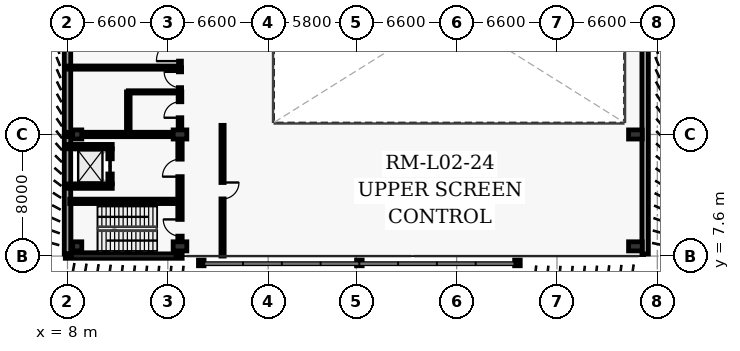
"""IFC4 building model, lengths in metres.
Left out: names, types, materials, properties, quantities, classifications, styles, units other than length and angle.
Written with IfcOpenShell. Run it as: python <this file> out.ifc"""

import sys

from ifc_helpers import new_model, si_unit, direction, frame, frame_2d, origin, origin_2d, place, context, subcontext, project, spatial, rectangle, i_section, extrude, element, fill, save


model = new_model("IFC4")
c1 = context("Model", 3, precision=1e-05, world=origin(), true_north=direction((0.0, 1.0)))
c2 = subcontext(c1, "Body", "Model", "MODEL_VIEW")
j1 = project(units=[si_unit("LENGTHUNIT", "METRE"), si_unit("PLANEANGLEUNIT", "RADIAN")], contexts=[c1])
p1 = place(None, origin())
s1 = spatial("IfcSite", under=j1, at=p1, CompositionType="ELEMENT")
p2 = place(p1, origin())
s2 = spatial("IfcBuilding", under=s1, at=p2, CompositionType="ELEMENT")
p3 = place(p2, frame((0.0, 0.0, 10.2)))
s3 = spatial("IfcBuildingStorey", under=s2, at=p3, CompositionType="ELEMENT", Elevation=10.2)
for number, where, z_axis, x_axis in (
    (1, (8.64, 8.24, 0.0), (0.0, 0.0, 1.0), (1.0, 0.0, 0.0)),
    (2, (8.64, 15.6, 0.0), (0.0, 0.0, 1.0), (1.0, 0.0, 0.0)),
):
    element("IfcColumn", number, at=place(p3, frame(where, z_axis=z_axis, x_axis=x_axis)), inside=s3, PredefinedType="COLUMN", context=c2, shape_type="SweptSolid", body=[
        extrude(rectangle(XDim=0.6, YDim=0.6, at=origin_2d()), origin(), (0.0, 0.0, 1.0), 5.4),
    ])
for number, where, z_axis, x_axis in (
    (3, (15.4, 8.24, 0.0), (0.0, 0.0, 1.0), (1.0, 0.0, 0.0)),
    (4, (15.4, 15.6, 0.0), (0.0, 0.0, 1.0), (1.0, 0.0, 0.0)),
    (5, (45.36, 8.24, 0.0), (0.0, 0.0, 1.0), (1.0, 0.0, 0.0)),
    (6, (45.36, 15.6, 0.0), (0.0, 0.0, 1.0), (1.0, 0.0, 0.0)),
):
    element("IfcColumn", number, at=place(p3, frame(where, z_axis=z_axis, x_axis=x_axis)), inside=s3, PredefinedType="COLUMN", context=c2, shape_type="SweptSolid", body=[
        extrude(rectangle(XDim=0.6, YDim=0.9, at=origin_2d()), origin(), (0.0, 0.0, 1.0), 5.4),
    ])
for number, where, z_axis, x_axis in (
    (7, (16.8, 7.15, 0.0), (0.0, 0.0, 1.0), (1.0, 0.0, 0.0)),
    (8, (27.2, 7.15, 0.0), (0.0, 0.0, 1.0), (1.0, 0.0, 0.0)),
    (9, (37.6, 7.15, 0.0), (0.0, 0.0, 1.0), (1.0, 0.0, 0.0)),
):
    element("IfcColumn", number, at=place(p3, frame(where, z_axis=z_axis, x_axis=x_axis)), inside=s3, PredefinedType="COLUMN", context=c2, shape_type="SweptSolid", body=[
        extrude(i_section(OverallWidth=0.373, OverallDepth=0.368, WebThickness=0.014, FlangeThickness=0.024, at=origin_2d()), origin(), (0.0, 0.0, 1.0), 5.4),
    ])
for number, where, z_axis, x_axis in (
    (10, (46.0, 63.46, 0.0), (0.0, 0.0, 1.0), (0.0, -1.0, 0.0)),
    (11, (8.0, 7.74, 0.0), (0.0, 0.0, 1.0), (0.0, 1.0, 0.0)),
):
    element("IfcWall", number, at=place(p3, frame(where, z_axis=z_axis, x_axis=x_axis)), inside=s3, PredefinedType="SOLIDWALL", context=c2, shape_type="SweptSolid", body=[
        extrude(rectangle(XDim=55.72, YDim=0.425, at=frame_2d((27.86, 0.0))), origin(), (0.0, 0.0, 1.0), 5.16),
    ])
p4 = place(p3, frame((7.855, 7.6, 0.0), z_axis=(0.0, 0.0, 1.0), x_axis=(1.0, 0.0, 0.0)))
e12 = element("IfcWall", 12, at=p4, inside=s3, PredefinedType="SHEAR", context=c2, shape_type="SweptSolid", body=[
    extrude(rectangle(XDim=7.69, YDim=0.29, at=frame_2d((3.845, 0.0))), origin(), (0.0, 0.0, 1.0), 5.16),
])
p5 = place(p3, frame((7.855, 15.6, 0.0), z_axis=(0.0, 0.0, 1.0), x_axis=(1.0, 0.0, 0.0)))
e13 = element("IfcWall", 13, at=p5, inside=s3, PredefinedType="SHEAR", context=c2, shape_type="SweptSolid", body=[
    extrude(rectangle(XDim=7.243, YDim=0.29, at=frame_2d((3.622, 0.0))), origin(), (0.0, 0.0, 1.0), 5.16),
])
p6 = place(p3, frame((15.4, 8.692, 0.0), z_axis=(0.0, 0.0, 1.0), x_axis=(0.0, 1.0, 0.0)))
e14 = element("IfcWall", 14, at=p6, inside=s3, PredefinedType="SHEAR", context=c2, shape_type="SweptSolid", body=[
    extrude(rectangle(XDim=6.456, YDim=0.29, at=frame_2d((3.228, 0.0))), origin(), (0.0, 0.0, 1.0), 5.16),
])
p7 = place(p6, frame((0.22, 0.0, 0.0)))
e15 = element("IfcOpeningElement", 15, at=p7, cuts=e14, PredefinedType="OPENING", context=c2, shape_type="SweptSolid", body=[
    extrude(rectangle(XDim=1.1, YDim=2.15, at=frame_2d((0.55, 1.075))), frame((0.0, 0.155, 0.0), z_axis=(0.0, -1.0, 0.0), x_axis=(1.0, 0.0, 0.0)), (0.0, 0.0, 1.0), 0.31),
])
p8 = place(p6, frame((4.133, 0.0, 0.0)))
e16 = element("IfcOpeningElement", 16, at=p8, cuts=e14, PredefinedType="OPENING", context=c2, shape_type="SweptSolid", body=[
    extrude(rectangle(XDim=1.15, YDim=2.2, at=frame_2d((0.575, 1.1))), frame((0.0, 0.155, 0.0), z_axis=(0.0, -1.0, 0.0), x_axis=(1.0, 0.0, 0.0)), (0.0, 0.0, 1.0), 0.31),
])
p9 = place(p3, frame((8.145, 11.2, 0.0), z_axis=(0.0, 0.0, 1.0), x_axis=(1.0, 0.0, 0.0)))
e17 = element("IfcWall", 17, at=p9, inside=s3, PredefinedType="SHEAR", context=c2, shape_type="SweptSolid", body=[
    extrude(rectangle(XDim=7.11, YDim=0.29, at=frame_2d((3.555, 0.0))), origin(), (0.0, 0.0, 1.0), 5.16),
])
for number, where, z_axis, x_axis in (
    (18, (8.055, 12.2, 0.0), (0.0, 0.0, 1.0), (1.0, 0.0, 0.0)),
    (19, (8.055, 14.8, 0.0), (0.0, 0.0, 1.0), (1.0, 0.0, 0.0)),
):
    element("IfcWall", number, at=place(p3, frame(where, z_axis=z_axis, x_axis=x_axis)), inside=s3, PredefinedType="SHEAR", context=c2, shape_type="SweptSolid", body=[
        extrude(rectangle(XDim=2.89, YDim=0.29, at=frame_2d((1.445, 0.0))), origin(), (0.0, 0.0, 1.0), 5.16),
    ])
p10 = place(p3, frame((10.8, 12.345, 0.0), z_axis=(0.0, 0.0, 1.0), x_axis=(0.0, 1.0, 0.0)))
e20 = element("IfcWall", 20, at=p10, inside=s3, PredefinedType="SHEAR", context=c2, shape_type="SweptSolid", body=[
    extrude(rectangle(XDim=2.31, YDim=0.29, at=frame_2d((1.155, 0.0))), origin(), (0.0, 0.0, 1.0), 5.16),
])
p11 = place(p10, frame((0.655, 0.0, 0.0)))
e21 = element("IfcOpeningElement", 21, at=p11, cuts=e20, PredefinedType="OPENING", context=c2, shape_type="SweptSolid", body=[
    extrude(rectangle(XDim=1.0, YDim=2.15, at=frame_2d((0.5, 1.075))), frame((0.0, 0.155, 0.0), z_axis=(0.0, -1.0, 0.0), x_axis=(1.0, 0.0, 0.0)), (0.0, 0.0, 1.0), 0.31),
])
p12 = place(p3, frame((15.4, 16.052, 0.0), z_axis=(0.0, 0.0, 1.0), x_axis=(0.0, 1.0, 0.0)))
e22 = element("IfcWall", 22, at=p12, inside=s3, PredefinedType="PARTITIONING", context=c2, shape_type="SweptSolid", body=[
    extrude(rectangle(XDim=2.348, YDim=0.24, at=frame_2d((1.174, 0.0))), origin(), (0.0, 0.0, 1.0), 4.31),
])
p13 = place(p12, frame((0.649, 0.0, 0.0)))
e23 = element("IfcOpeningElement", 23, at=p13, cuts=e22, PredefinedType="OPENING", context=c2, shape_type="SweptSolid", body=[
    extrude(rectangle(XDim=1.05, YDim=2.15, at=frame_2d((0.525, 1.075))), frame((0.0, 0.13, 0.0), z_axis=(0.0, -1.0, 0.0), x_axis=(1.0, 0.0, 0.0)), (0.0, 0.0, 1.0), 0.26),
])
p14 = place(p3, frame((15.4, 18.4, 0.0), z_axis=(0.0, 0.0, 1.0), x_axis=(0.0, 1.0, 0.0)))
e24 = element("IfcWall", 24, at=p14, inside=s3, PredefinedType="PARTITIONING", context=c2, shape_type="SweptSolid", body=[
    extrude(rectangle(XDim=1.6, YDim=0.21, at=frame_2d((0.8, 0.0))), origin(), (0.0, 0.0, 1.0), 4.31),
])
p15 = place(p14, frame((0.28, 0.0, 0.0)))
e25 = element("IfcOpeningElement", 25, at=p15, cuts=e24, PredefinedType="OPENING", context=c2, shape_type="SweptSolid", body=[
    extrude(rectangle(XDim=1.04, YDim=2.2, at=frame_2d((0.52, 1.1))), frame((0.0, 0.115, 0.0), z_axis=(0.0, -1.0, 0.0), x_axis=(1.0, 0.0, 0.0)), (0.0, 0.0, 1.0), 0.23),
])
p16 = place(p3, frame((15.4, 20.0, 0.0), z_axis=(0.0, 0.0, 1.0), x_axis=(0.0, 1.0, 0.0)))
e26 = element("IfcWall", 26, at=p16, inside=s3, PredefinedType="PARTITIONING", context=c2, shape_type="SweptSolid", body=[
    extrude(rectangle(XDim=2.4, YDim=0.19, at=frame_2d((1.2, 0.0))), origin(), (0.0, 0.0, 1.0), 4.31),
])
p17 = place(p16, frame((0.425, 0.0, 0.0)))
e27 = element("IfcOpeningElement", 27, at=p17, cuts=e26, PredefinedType="OPENING", context=c2, shape_type="SweptSolid", body=[
    extrude(rectangle(XDim=1.55, YDim=2.25, at=frame_2d((0.775, 1.125))), frame((0.0, 0.105, 0.0), z_axis=(0.0, -1.0, 0.0), x_axis=(1.0, 0.0, 0.0)), (0.0, 0.0, 1.0), 0.21),
])
p18 = place(p3, frame((18.2, 16.2, 0.0), z_axis=(0.0, 0.0, 1.0), x_axis=(0.0, -1.0, 0.0)))
e28 = element("IfcWall", 28, at=p18, inside=s3, PredefinedType="PARTITIONING", context=c2, shape_type="SweptSolid", body=[
    extrude(rectangle(XDim=8.6, YDim=0.21, at=frame_2d((4.3, 0.0))), origin(), (0.0, 0.0, 1.0), 5.16),
])
p19 = place(p18, frame((3.76, 0.0, 0.0)))
e29 = element("IfcOpeningElement", 29, at=p19, cuts=e28, PredefinedType="OPENING", context=c2, shape_type="SweptSolid", body=[
    extrude(rectangle(XDim=1.08, YDim=2.15, at=frame_2d((0.54, 1.075))), frame((0.0, 0.115, 0.0), z_axis=(0.0, -1.0, 0.0), x_axis=(1.0, 0.0, 0.0)), (0.0, 0.0, 1.0), 0.23),
])
p20 = place(p3, frame((12.0, 18.4, 0.0), z_axis=(0.0, 0.0, 1.0), x_axis=(1.0, 0.0, 0.0)))
e30 = element("IfcWall", 30, at=p20, inside=s3, PredefinedType="PARTITIONING", context=c2, shape_type="SweptSolid", body=[
    extrude(rectangle(XDim=3.4, YDim=0.15, at=frame_2d((1.7, 0.0))), origin(), (0.0, 0.0, 1.0), 5.16),
])
p21 = place(p3, frame((12.0, 15.6, 0.0), z_axis=(0.0, 0.0, 1.0), x_axis=(0.0, 1.0, 0.0)))
e31 = element("IfcWall", 31, at=p21, inside=s3, PredefinedType="PARTITIONING", context=c2, shape_type="SweptSolid", body=[
    extrude(rectangle(XDim=2.8, YDim=0.24, at=frame_2d((1.4, 0.0))), origin(), (0.0, 0.0, 1.0), 5.16),
])
p22 = place(p3, frame((8.0, 20.0, 0.0), z_axis=(0.0, 0.0, 1.0), x_axis=(1.0, 0.0, 0.0)))
e32 = element("IfcWall", 32, at=p22, inside=s3, PredefinedType="PARTITIONING", context=c2, shape_type="SweptSolid", body=[
    extrude(rectangle(XDim=7.4, YDim=0.21, at=frame_2d((3.7, 0.0))), origin(), (0.0, 0.0, 1.0), 5.16),
])
p23 = place(p7, origin())
e33 = element("IfcDoor", 33, at=p23, inside=s3, OperationType="SINGLE_SWING_RIGHT", PredefinedType="DOOR", context=c2, shape_type="SweptSolid", body=[
    extrude(rectangle(XDim=1.1, YDim=2.15, at=frame_2d((0.55, 1.075))), frame((0.0, 0.025, 0.0), z_axis=(0.0, -1.0, 0.0), x_axis=(1.0, 0.0, 0.0)), (0.0, 0.0, 1.0), 0.05),
])
fill(e15, e33)
p24 = place(p8, origin())
e34 = element("IfcDoor", 34, at=p24, inside=s3, OperationType="SINGLE_SWING_LEFT", PredefinedType="DOOR", context=c2, shape_type="SweptSolid", body=[
    extrude(rectangle(XDim=1.15, YDim=2.2, at=frame_2d((0.575, 1.1))), frame((0.0, 0.025, 0.0), z_axis=(0.0, -1.0, 0.0), x_axis=(1.0, 0.0, 0.0)), (0.0, 0.0, 1.0), 0.05),
])
fill(e16, e34)
p25 = place(p11, origin())
e35 = element("IfcDoor", 35, at=p25, inside=s3, OperationType="SLIDING_TO_LEFT", PredefinedType="DOOR", context=c2, shape_type="SweptSolid", body=[
    extrude(rectangle(XDim=1.0, YDim=2.15, at=frame_2d((0.5, 1.075))), frame((0.0, 0.025, 0.0), z_axis=(0.0, -1.0, 0.0), x_axis=(1.0, 0.0, 0.0)), (0.0, 0.0, 1.0), 0.05),
])
fill(e21, e35)
p26 = place(p13, origin())
e36 = element("IfcDoor", 36, at=p26, inside=s3, OperationType="SINGLE_SWING_LEFT", PredefinedType="DOOR", context=c2, shape_type="SweptSolid", body=[
    extrude(rectangle(XDim=1.05, YDim=2.15, at=frame_2d((0.525, 1.075))), frame((0.0, 0.025, 0.0), z_axis=(0.0, -1.0, 0.0), x_axis=(1.0, 0.0, 0.0)), (0.0, 0.0, 1.0), 0.05),
])
fill(e23, e36)
p27 = place(p15, origin())
e37 = element("IfcDoor", 37, at=p27, inside=s3, OperationType="SINGLE_SWING_RIGHT", PredefinedType="DOOR", context=c2, shape_type="SweptSolid", body=[
    extrude(rectangle(XDim=1.04, YDim=2.2, at=frame_2d((0.52, 1.1))), frame((0.0, 0.025, 0.0), z_axis=(0.0, -1.0, 0.0), x_axis=(1.0, 0.0, 0.0)), (0.0, 0.0, 1.0), 0.05),
])
fill(e25, e37)
p28 = place(p17, origin())
e38 = element("IfcDoor", 38, at=p28, inside=s3, OperationType="SINGLE_SWING_LEFT", PredefinedType="DOOR", context=c2, shape_type="SweptSolid", body=[
    extrude(rectangle(XDim=1.55, YDim=2.25, at=frame_2d((0.775, 1.125))), frame((0.0, 0.025, 0.0), z_axis=(0.0, -1.0, 0.0), x_axis=(1.0, 0.0, 0.0)), (0.0, 0.0, 1.0), 0.05),
])
fill(e27, e38)
p29 = place(p19, origin())
e39 = element("IfcDoor", 39, at=p29, inside=s3, OperationType="SINGLE_SWING_LEFT", PredefinedType="DOOR", context=c2, shape_type="SweptSolid", body=[
    extrude(rectangle(XDim=1.08, YDim=2.15, at=frame_2d((0.54, 1.075))), frame((0.0, 0.025, 0.0), z_axis=(0.0, -1.0, 0.0), x_axis=(1.0, 0.0, 0.0)), (0.0, 0.0, 1.0), 0.05),
])
fill(e29, e39)
save(model, sys.argv[1])
